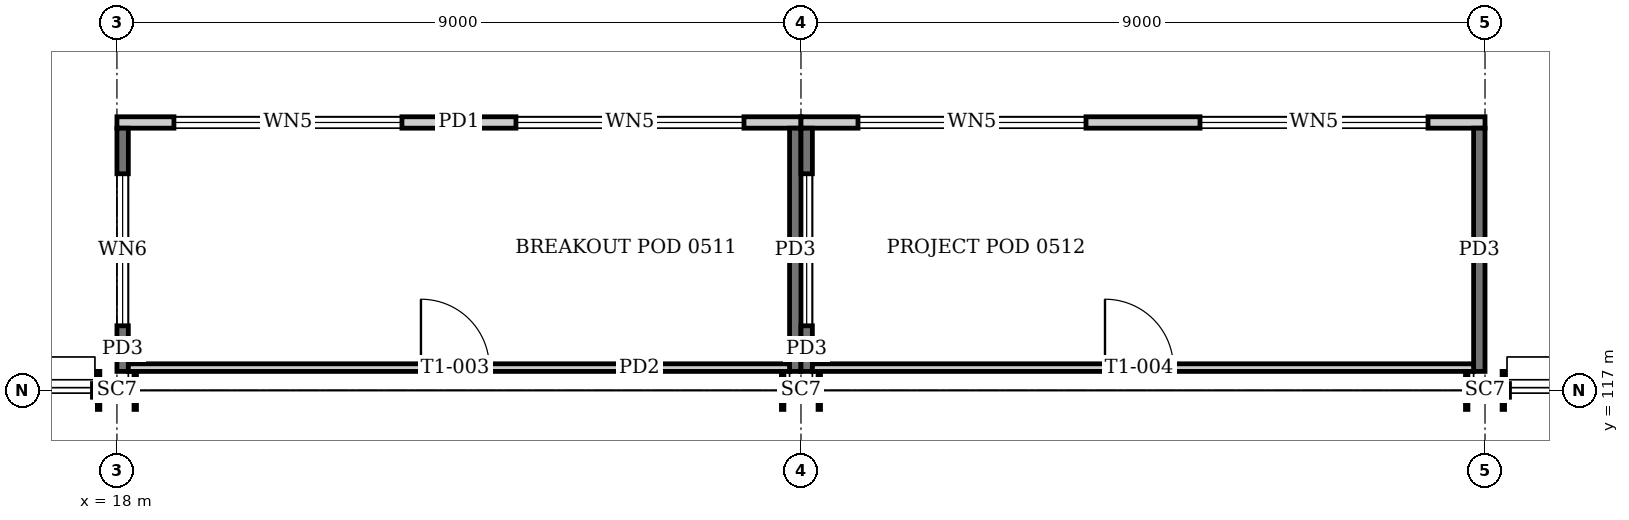
"""IFC4 building model, lengths in metres.
Left out: names, types, materials, properties, quantities, classifications, styles, units other than length and angle.
Written with IfcOpenShell. Run it as: python <this file> out.ifc"""

import sys

from ifc_helpers import new_model, si_unit, direction, frame, frame_2d, origin, origin_2d, place, context, subcontext, project, spatial, rectangle, i_section, extrude, element, fill, save


model = new_model("IFC4")
c1 = context("Model", 3, precision=1e-05, world=origin(), true_north=direction((0.0, 1.0)))
c2 = subcontext(c1, "Body", "Model", "MODEL_VIEW")
j1 = project(units=[si_unit("LENGTHUNIT", "METRE"), si_unit("PLANEANGLEUNIT", "RADIAN")], contexts=[c1])
p1 = place(None, origin())
s1 = spatial("IfcSite", under=j1, at=p1, CompositionType="ELEMENT")
p2 = place(p1, origin())
s2 = spatial("IfcBuilding", under=s1, at=p2, CompositionType="ELEMENT")
p3 = place(p2, frame((0.0, 0.0, 23.2)))
s3 = spatial("IfcBuildingStorey", under=s2, at=p3, CompositionType="ELEMENT", Elevation=23.2)
for number, where, z_axis, x_axis in (
    (1, (18.0, 117.0, 0.0), (0.0, 0.0, 1.0), (0.0, 1.0, 0.0)),
    (2, (27.0, 117.0, 0.0), (0.0, 0.0, 1.0), (0.0, 1.0, 0.0)),
    (3, (36.0, 117.0, 0.0), (0.0, 0.0, 1.0), (0.0, 1.0, 0.0)),
):
    element("IfcColumn", number, at=place(p3, frame(where, z_axis=z_axis, x_axis=x_axis)), inside=s3, PredefinedType="COLUMN", context=c2, shape_type="SweptSolid", body=[
        extrude(i_section(OverallWidth=0.5, OverallDepth=0.514, WebThickness=0.025, FlangeThickness=0.032, at=origin_2d()), origin(), (0.0, 0.0, 1.0), 4.0),
    ])
p4 = place(p3, frame((18.0, 120.525, 0.0), z_axis=(0.0, 0.0, 1.0), x_axis=(1.0, 0.0, 0.0)))
e4 = element("IfcWall", 4, at=p4, inside=s3, PredefinedType="SOLIDWALL", context=c2, shape_type="SweptSolid", body=[
    extrude(rectangle(XDim=9.0, YDim=0.15, at=frame_2d((4.5, 0.0))), origin(), (0.0, 0.0, 1.0), 2.6),
])
p5 = place(p4, frame((0.75, 0.0, 0.9)))
e5 = element("IfcOpeningElement", 5, at=p5, cuts=e4, PredefinedType="OPENING", context=c2, shape_type="SweptSolid", body=[
    extrude(rectangle(XDim=3.0, YDim=1.4, at=frame_2d((1.5, 0.7))), frame((0.0, 0.085, 0.0), z_axis=(0.0, -1.0, 0.0), x_axis=(1.0, 0.0, 0.0)), (0.0, 0.0, 1.0), 0.17),
])
p6 = place(p4, frame((5.25, 0.0, 0.9)))
e6 = element("IfcOpeningElement", 6, at=p6, cuts=e4, PredefinedType="OPENING", context=c2, shape_type="SweptSolid", body=[
    extrude(rectangle(XDim=3.0, YDim=1.4, at=frame_2d((1.5, 0.7))), frame((0.0, 0.085, 0.0), z_axis=(0.0, -1.0, 0.0), x_axis=(1.0, 0.0, 0.0)), (0.0, 0.0, 1.0), 0.17),
])
p7 = place(p3, frame((18.075, 120.45, -0.15), z_axis=(0.0, 0.0, 1.0), x_axis=(0.0, -1.0, 0.0)))
e7 = element("IfcWall", 7, at=p7, inside=s3, PredefinedType="SOLIDWALL", context=c2, shape_type="SweptSolid", body=[
    extrude(rectangle(XDim=3.2, YDim=0.15, at=frame_2d((1.6, 0.0))), origin(), (0.0, 0.0, 1.0), 2.75),
])
p8 = place(p7, frame((0.6, 0.0, 1.05)))
e8 = element("IfcOpeningElement", 8, at=p8, cuts=e7, PredefinedType="OPENING", context=c2, shape_type="SweptSolid", body=[
    extrude(rectangle(XDim=2.0, YDim=1.4, at=frame_2d((1.0, 0.7))), frame((0.0, 0.085, 0.0), z_axis=(0.0, -1.0, 0.0), x_axis=(1.0, 0.0, 0.0)), (0.0, 0.0, 1.0), 0.17),
])
p9 = place(p3, frame((26.925, 120.45, -0.15), z_axis=(0.0, 0.0, 1.0), x_axis=(0.0, -1.0, 0.0)))
e9 = element("IfcWall", 9, at=p9, inside=s3, PredefinedType="SOLIDWALL", context=c2, shape_type="SweptSolid", body=[
    extrude(rectangle(XDim=3.2, YDim=0.15, at=frame_2d((1.6, 0.0))), origin(), (0.0, 0.0, 1.0), 2.75),
])
p10 = place(p3, frame((18.15, 117.3, 0.0), z_axis=(0.0, 0.0, 1.0), x_axis=(1.0, 0.0, 0.0)))
e10 = element("IfcWall", 10, at=p10, inside=s3, PredefinedType="PARTITIONING", context=c2, shape_type="SweptSolid", body=[
    extrude(rectangle(XDim=8.7, YDim=0.1, at=frame_2d((4.35, 0.0))), origin(), (0.0, 0.0, 1.0), 2.6),
])
p11 = place(p10, frame((3.85, 0.0, 0.0)))
e11 = element("IfcOpeningElement", 11, at=p11, cuts=e10, PredefinedType="OPENING", context=c2, shape_type="SweptSolid", body=[
    extrude(rectangle(XDim=0.9, YDim=2.1, at=frame_2d((0.45, 1.05))), frame((0.0, 0.06, 0.0), z_axis=(0.0, -1.0, 0.0), x_axis=(1.0, 0.0, 0.0)), (0.0, 0.0, 1.0), 0.12),
])
p12 = place(p3, frame((27.0, 120.525, 0.0), z_axis=(0.0, 0.0, 1.0), x_axis=(1.0, 0.0, 0.0)))
e12 = element("IfcWall", 12, at=p12, inside=s3, PredefinedType="SOLIDWALL", context=c2, shape_type="SweptSolid", body=[
    extrude(rectangle(XDim=9.0, YDim=0.15, at=frame_2d((4.5, 0.0))), origin(), (0.0, 0.0, 1.0), 2.6),
])
p13 = place(p12, frame((0.75, 0.0, 0.9)))
e13 = element("IfcOpeningElement", 13, at=p13, cuts=e12, PredefinedType="OPENING", context=c2, shape_type="SweptSolid", body=[
    extrude(rectangle(XDim=3.0, YDim=1.4, at=frame_2d((1.5, 0.7))), frame((0.0, 0.085, 0.0), z_axis=(0.0, -1.0, 0.0), x_axis=(1.0, 0.0, 0.0)), (0.0, 0.0, 1.0), 0.17),
])
p14 = place(p12, frame((5.25, 0.0, 0.9)))
e14 = element("IfcOpeningElement", 14, at=p14, cuts=e12, PredefinedType="OPENING", context=c2, shape_type="SweptSolid", body=[
    extrude(rectangle(XDim=3.0, YDim=1.4, at=frame_2d((1.5, 0.7))), frame((0.0, 0.085, 0.0), z_axis=(0.0, -1.0, 0.0), x_axis=(1.0, 0.0, 0.0)), (0.0, 0.0, 1.0), 0.17),
])
p15 = place(p3, frame((27.075, 120.45, -0.15), z_axis=(0.0, 0.0, 1.0), x_axis=(0.0, -1.0, 0.0)))
e15 = element("IfcWall", 15, at=p15, inside=s3, PredefinedType="SOLIDWALL", context=c2, shape_type="SweptSolid", body=[
    extrude(rectangle(XDim=3.2, YDim=0.15, at=frame_2d((1.6, 0.0))), origin(), (0.0, 0.0, 1.0), 2.75),
])
p16 = place(p15, frame((0.6, 0.0, 1.05)))
e16 = element("IfcOpeningElement", 16, at=p16, cuts=e15, PredefinedType="OPENING", context=c2, shape_type="SweptSolid", body=[
    extrude(rectangle(XDim=2.0, YDim=1.4, at=frame_2d((1.0, 0.7))), frame((0.0, 0.085, 0.0), z_axis=(0.0, -1.0, 0.0), x_axis=(1.0, 0.0, 0.0)), (0.0, 0.0, 1.0), 0.17),
])
p17 = place(p3, frame((35.925, 120.45, -0.15), z_axis=(0.0, 0.0, 1.0), x_axis=(0.0, -1.0, 0.0)))
e17 = element("IfcWall", 17, at=p17, inside=s3, PredefinedType="SOLIDWALL", context=c2, shape_type="SweptSolid", body=[
    extrude(rectangle(XDim=3.2, YDim=0.15, at=frame_2d((1.6, 0.0))), origin(), (0.0, 0.0, 1.0), 2.75),
])
p18 = place(p3, frame((27.15, 117.3, 0.0), z_axis=(0.0, 0.0, 1.0), x_axis=(1.0, 0.0, 0.0)))
e18 = element("IfcWall", 18, at=p18, inside=s3, PredefinedType="PARTITIONING", context=c2, shape_type="SweptSolid", body=[
    extrude(rectangle(XDim=8.7, YDim=0.1, at=frame_2d((4.35, 0.0))), origin(), (0.0, 0.0, 1.0), 2.6),
])
p19 = place(p18, frame((3.85, 0.0, 0.0)))
e19 = element("IfcOpeningElement", 19, at=p19, cuts=e18, PredefinedType="OPENING", context=c2, shape_type="SweptSolid", body=[
    extrude(rectangle(XDim=0.9, YDim=2.1, at=frame_2d((0.45, 1.05))), frame((0.0, 0.06, 0.0), z_axis=(0.0, -1.0, 0.0), x_axis=(1.0, 0.0, 0.0)), (0.0, 0.0, 1.0), 0.12),
])
p20 = place(p5, origin())
e20 = element("IfcWindow", 20, at=p20, inside=s3, PartitioningType="SINGLE_PANEL", PredefinedType="WINDOW", context=c2, shape_type="SweptSolid", body=[
    extrude(rectangle(XDim=3.0, YDim=1.4, at=frame_2d((1.5, 0.7))), frame((0.0, 0.03, 0.0), z_axis=(0.0, -1.0, 0.0), x_axis=(1.0, 0.0, 0.0)), (0.0, 0.0, 1.0), 0.06),
])
fill(e5, e20)
p21 = place(p6, origin())
e21 = element("IfcWindow", 21, at=p21, inside=s3, PartitioningType="SINGLE_PANEL", PredefinedType="WINDOW", context=c2, shape_type="SweptSolid", body=[
    extrude(rectangle(XDim=3.0, YDim=1.4, at=frame_2d((1.5, 0.7))), frame((0.0, 0.03, 0.0), z_axis=(0.0, -1.0, 0.0), x_axis=(1.0, 0.0, 0.0)), (0.0, 0.0, 1.0), 0.06),
])
fill(e6, e21)
p22 = place(p8, origin())
e22 = element("IfcWindow", 22, at=p22, inside=s3, PartitioningType="SINGLE_PANEL", PredefinedType="WINDOW", context=c2, shape_type="SweptSolid", body=[
    extrude(rectangle(XDim=2.0, YDim=1.4, at=frame_2d((1.0, 0.7))), frame((0.0, 0.03, 0.0), z_axis=(0.0, -1.0, 0.0), x_axis=(1.0, 0.0, 0.0)), (0.0, 0.0, 1.0), 0.06),
])
fill(e8, e22)
p23 = place(p11, origin())
e23 = element("IfcDoor", 23, at=p23, inside=s3, OperationType="SINGLE_SWING_LEFT", PredefinedType="DOOR", context=c2, shape_type="SweptSolid", body=[
    extrude(rectangle(XDim=0.9, YDim=2.1, at=frame_2d((0.45, 1.05))), frame((0.0, 0.025, 0.0), z_axis=(0.0, -1.0, 0.0), x_axis=(1.0, 0.0, 0.0)), (0.0, 0.0, 1.0), 0.05),
])
fill(e11, e23)
p24 = place(p13, origin())
e24 = element("IfcWindow", 24, at=p24, inside=s3, PartitioningType="SINGLE_PANEL", PredefinedType="WINDOW", context=c2, shape_type="SweptSolid", body=[
    extrude(rectangle(XDim=3.0, YDim=1.4, at=frame_2d((1.5, 0.7))), frame((0.0, 0.03, 0.0), z_axis=(0.0, -1.0, 0.0), x_axis=(1.0, 0.0, 0.0)), (0.0, 0.0, 1.0), 0.06),
])
fill(e13, e24)
p25 = place(p14, origin())
e25 = element("IfcWindow", 25, at=p25, inside=s3, PartitioningType="SINGLE_PANEL", PredefinedType="WINDOW", context=c2, shape_type="SweptSolid", body=[
    extrude(rectangle(XDim=3.0, YDim=1.4, at=frame_2d((1.5, 0.7))), frame((0.0, 0.03, 0.0), z_axis=(0.0, -1.0, 0.0), x_axis=(1.0, 0.0, 0.0)), (0.0, 0.0, 1.0), 0.06),
])
fill(e14, e25)
p26 = place(p16, origin())
e26 = element("IfcWindow", 26, at=p26, inside=s3, PartitioningType="SINGLE_PANEL", PredefinedType="WINDOW", context=c2, shape_type="SweptSolid", body=[
    extrude(rectangle(XDim=2.0, YDim=1.4, at=frame_2d((1.0, 0.7))), frame((0.0, 0.03, 0.0), z_axis=(0.0, -1.0, 0.0), x_axis=(1.0, 0.0, 0.0)), (0.0, 0.0, 1.0), 0.06),
])
fill(e16, e26)
p27 = place(p19, origin())
e27 = element("IfcDoor", 27, at=p27, inside=s3, OperationType="SINGLE_SWING_LEFT", PredefinedType="DOOR", context=c2, shape_type="SweptSolid", body=[
    extrude(rectangle(XDim=0.9, YDim=2.1, at=frame_2d((0.45, 1.05))), frame((0.0, 0.025, 0.0), z_axis=(0.0, -1.0, 0.0), x_axis=(1.0, 0.0, 0.0)), (0.0, 0.0, 1.0), 0.05),
])
fill(e19, e27)
save(model, sys.argv[1])
